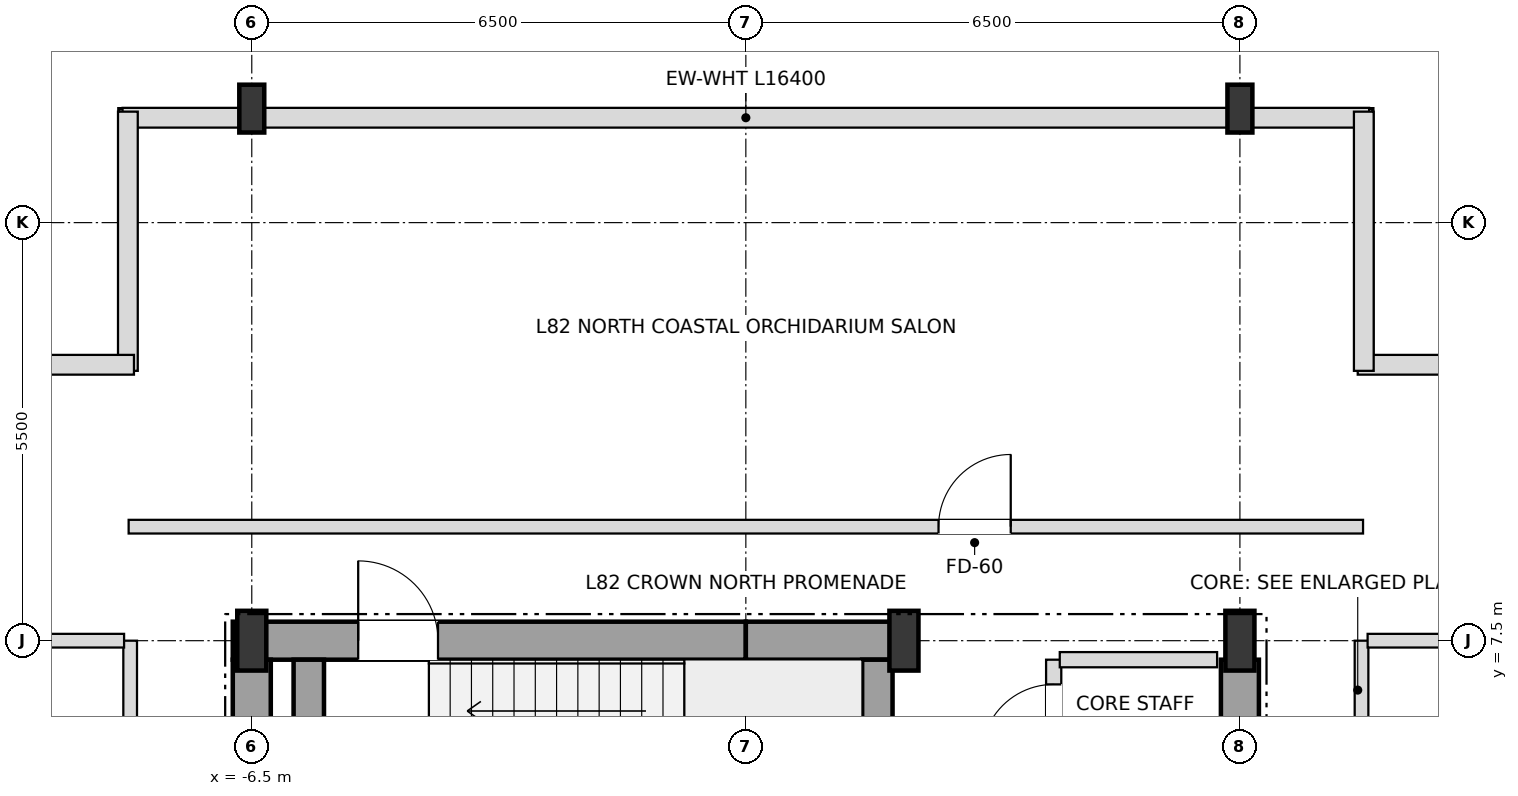
"""IFC4 building model, lengths in metres.
Left out: names, types, materials, properties, quantities, classifications, styles, units other than length and angle.
Written with IfcOpenShell. Run it as: python <this file> out.ifc"""

import sys

from ifc_helpers import new_model, si_unit, direction, frame, frame_2d, origin, origin_2d, place, context, subcontext, project, spatial, rectangle, i_section, extrude, element, fill, save


model = new_model("IFC4")
c1 = context("Model", 3, precision=1e-05, world=origin(), true_north=direction((0.0, 1.0)))
c2 = subcontext(c1, "Body", "Model", "MODEL_VIEW")
j1 = project(units=[si_unit("LENGTHUNIT", "METRE"), si_unit("PLANEANGLEUNIT", "RADIAN")], contexts=[c1])
p1 = place(None, origin())
s1 = spatial("IfcSite", under=j1, at=p1, CompositionType="ELEMENT")
p2 = place(p1, origin())
s2 = spatial("IfcBuilding", under=s1, at=p2, CompositionType="ELEMENT")
p3 = place(p2, frame((0.0, 0.0, 314.4)))
s3 = spatial("IfcBuildingStorey", under=s2, at=p3, CompositionType="ELEMENT", Elevation=314.4)
for number, where, z_axis, x_axis in (
    (1, (-6.5, 7.5, 0.0), (0.0, 0.0, 1.0), (1.0, 0.0, 0.0)),
    (2, (2.08, 7.5, 0.0), (0.0, 0.0, 1.0), (1.0, 0.0, 0.0)),
    (3, (6.5, 7.5, 0.0), (0.0, 0.0, 1.0), (1.0, 0.0, 0.0)),
):
    element("IfcColumn", number, at=place(p3, frame(where, z_axis=z_axis, x_axis=x_axis)), inside=s3, PredefinedType="COLUMN", context=c2, shape_type="SweptSolid", body=[
        extrude(i_section(OverallWidth=0.382, OverallDepth=0.786, WebThickness=0.02, FlangeThickness=0.033, at=origin_2d()), origin(), (0.0, 0.0, 1.0), 4.5),
    ])
for number, where, z_axis, x_axis in (
    (4, (-6.5, 14.5, 0.0), (0.0, 0.0, 1.0), (1.0, 0.0, 0.0)),
    (5, (6.5, 14.5, 0.0), (0.0, 0.0, 1.0), (1.0, 0.0, 0.0)),
):
    element("IfcColumn", number, at=place(p3, frame(where, z_axis=z_axis, x_axis=x_axis)), inside=s3, PredefinedType="COLUMN", context=c2, shape_type="SweptSolid", body=[
        extrude(i_section(OverallWidth=0.328, OverallDepth=0.629, WebThickness=0.014, FlangeThickness=0.021, at=origin_2d()), origin(), (0.0, 0.0, 1.0), 4.5),
    ])
p4 = place(p3, frame((8.2, 14.38, 0.0), z_axis=(0.0, 0.0, 1.0), x_axis=(-1.0, 0.0, 0.0)))
e6 = element("IfcWall", 6, at=p4, inside=s3, PredefinedType="SOLIDWALL", context=c2, shape_type="SweptSolid", body=[
    extrude(rectangle(XDim=16.4, YDim=0.26, at=frame_2d((8.2, 0.0))), origin(), (0.0, 0.0, 1.0), 3.918),
])
for number, where, z_axis, x_axis in (
    (7, (11.46, 11.13, 0.0), (0.0, 0.0, 1.0), (-1.0, 0.0, 0.0)),
    (8, (8.13, 11.05, 0.0), (0.0, 0.0, 1.0), (0.0, 1.0, 0.0)),
    (9, (-8.13, 14.46, 0.0), (0.0, 0.0, 1.0), (0.0, -1.0, 0.0)),
    (10, (-8.05, 11.13, 0.0), (0.0, 0.0, 1.0), (-1.0, 0.0, 0.0)),
):
    element("IfcWall", number, at=place(p3, frame(where, z_axis=z_axis, x_axis=x_axis)), inside=s3, PredefinedType="SOLIDWALL", context=c2, shape_type="SweptSolid", body=[
        extrude(rectangle(XDim=3.41, YDim=0.26, at=frame_2d((1.705, 0.0))), origin(), (0.0, 0.0, 1.0), 4.25),
    ])
p5 = place(p3, frame((-6.75, 7.5, 0.0), z_axis=(0.0, 0.0, 1.0), x_axis=(1.0, 0.0, 0.0)))
e11 = element("IfcWall", 11, at=p5, inside=s3, PredefinedType="SHEAR", context=c2, shape_type="SweptSolid", body=[
    extrude(rectangle(XDim=6.75, YDim=0.5, at=frame_2d((3.375, 0.0))), origin(), (0.0, 0.0, 1.0), 4.25),
])
p6 = place(p5, frame((1.65, 0.0, 0.0)))
e12 = element("IfcOpeningElement", 12, at=p6, cuts=e11, PredefinedType="OPENING", context=c2, shape_type="SweptSolid", body=[
    extrude(rectangle(XDim=1.05, YDim=2.15, at=frame_2d((0.525, 1.075))), frame((0.0, 0.26, 0.0), z_axis=(0.0, -1.0, 0.0), x_axis=(1.0, 0.0, 0.0)), (0.0, 0.0, 1.0), 0.52),
])
p7 = place(p3, frame((0.0, 7.5, 0.0), z_axis=(0.0, 0.0, 1.0), x_axis=(1.0, 0.0, 0.0)))
e13 = element("IfcWall", 13, at=p7, inside=s3, PredefinedType="SHEAR", context=c2, shape_type="SweptSolid", body=[
    extrude(rectangle(XDim=2.08, YDim=0.5, at=frame_2d((1.04, 0.0))), origin(), (0.0, 0.0, 1.0), 4.25),
])
for number, where, z_axis, x_axis in (
    (14, (-6.5, 3.95, 0.0), (0.0, 0.0, 1.0), (0.0, 1.0, 0.0)),
    (15, (6.5, 3.95, 0.0), (0.0, 0.0, 1.0), (0.0, 1.0, 0.0)),
):
    element("IfcWall", number, at=place(p3, frame(where, z_axis=z_axis, x_axis=x_axis)), inside=s3, PredefinedType="SHEAR", context=c2, shape_type="SweptSolid", body=[
        extrude(rectangle(XDim=3.3, YDim=0.5, at=frame_2d((1.65, 0.0))), origin(), (0.0, 0.0, 1.0), 4.25),
    ])
for number, where, z_axis, x_axis in (
    (16, (1.73, 3.95, 0.0), (0.0, 0.0, 1.0), (0.0, 1.0, 0.0)),
    (17, (-5.75, 3.95, 0.0), (0.0, 0.0, 1.0), (0.0, 1.0, 0.0)),
):
    element("IfcWall", number, at=place(p3, frame(where, z_axis=z_axis, x_axis=x_axis)), inside=s3, PredefinedType="SHEAR", context=c2, shape_type="SweptSolid", body=[
        extrude(rectangle(XDim=3.3, YDim=0.4, at=frame_2d((1.65, 0.0))), origin(), (0.0, 0.0, 1.0), 4.25),
    ])
p8 = place(p3, frame((-8.1, -7.5, 0.0), z_axis=(0.0, 0.0, 1.0), x_axis=(0.0, 1.0, 0.0)))
e18 = element("IfcWall", 18, at=p8, inside=s3, PredefinedType="PARTITIONING", context=c2, shape_type="SweptSolid", body=[
    extrude(rectangle(XDim=15.0, YDim=0.18, at=frame_2d((7.5, 0.0))), origin(), (0.0, 0.0, 1.0), 4.25),
])
p9 = place(p8, frame((4.525, 0.0, 0.0)))
e19 = element("IfcOpeningElement", 19, at=p9, cuts=e18, PredefinedType="OPENING", context=c2, shape_type="SweptSolid", body=[
    extrude(rectangle(XDim=0.95, YDim=2.15, at=frame_2d((0.475, 1.075))), frame((0.0, 0.1, 0.0), z_axis=(0.0, -1.0, 0.0), x_axis=(1.0, 0.0, 0.0)), (0.0, 0.0, 1.0), 0.2),
])
p10 = place(p3, frame((4.05, 4.2, 0.0), z_axis=(0.0, 0.0, 1.0), x_axis=(0.0, 1.0, 0.0)))
e20 = element("IfcWall", 20, at=p10, inside=s3, PredefinedType="SOLIDWALL", context=c2, shape_type="SweptSolid", body=[
    extrude(rectangle(XDim=3.05, YDim=0.2, at=frame_2d((1.525, 0.0))), origin(), (0.0, 0.0, 1.0), 4.25),
])
p11 = place(p10, frame((0.275, 0.0, 0.0)))
e21 = element("IfcOpeningElement", 21, at=p11, cuts=e20, PredefinedType="OPENING", context=c2, shape_type="SweptSolid", body=[
    extrude(rectangle(XDim=0.95, YDim=2.15, at=frame_2d((0.475, 1.075))), frame((0.0, 0.11, 0.0), z_axis=(0.0, -1.0, 0.0), x_axis=(1.0, 0.0, 0.0)), (0.0, 0.0, 1.0), 0.22),
])
p12 = place(p10, frame((1.775, 0.0, 0.0)))
e22 = element("IfcOpeningElement", 22, at=p12, cuts=e20, PredefinedType="OPENING", context=c2, shape_type="SweptSolid", body=[
    extrude(rectangle(XDim=0.95, YDim=2.15, at=frame_2d((0.475, 1.075))), frame((0.0, 0.11, 0.0), z_axis=(0.0, -1.0, 0.0), x_axis=(1.0, 0.0, 0.0)), (0.0, 0.0, 1.0), 0.22),
])
p13 = place(p3, frame((8.1, -7.5, 0.0), z_axis=(0.0, 0.0, 1.0), x_axis=(0.0, 1.0, 0.0)))
e23 = element("IfcWall", 23, at=p13, inside=s3, PredefinedType="PARTITIONING", context=c2, shape_type="SweptSolid", body=[
    extrude(rectangle(XDim=15.0, YDim=0.18, at=frame_2d((7.5, 0.0))), origin(), (0.0, 0.0, 1.0), 4.25),
])
p14 = place(p13, frame((4.525, 0.0, 0.0)))
e24 = element("IfcOpeningElement", 24, at=p14, cuts=e23, PredefinedType="OPENING", context=c2, shape_type="SweptSolid", body=[
    extrude(rectangle(XDim=0.95, YDim=2.15, at=frame_2d((0.475, 1.075))), frame((0.0, 0.1, 0.0), z_axis=(0.0, -1.0, 0.0), x_axis=(1.0, 0.0, 0.0)), (0.0, 0.0, 1.0), 0.2),
])
p15 = place(p13, frame((11.825, 0.0, 0.0)))
e25 = element("IfcOpeningElement", 25, at=p15, cuts=e23, PredefinedType="OPENING", context=c2, shape_type="SweptSolid", body=[
    extrude(rectangle(XDim=0.95, YDim=2.15, at=frame_2d((0.475, 1.075))), frame((0.0, 0.1, 0.0), z_axis=(0.0, -1.0, 0.0), x_axis=(1.0, 0.0, 0.0)), (0.0, 0.0, 1.0), 0.2),
])
p16 = place(p3, frame((4.13, 7.25, 0.0), z_axis=(0.0, 0.0, 1.0), x_axis=(1.0, 0.0, 0.0)))
e26 = element("IfcWall", 26, at=p16, inside=s3, PredefinedType="SOLIDWALL", context=c2, shape_type="SweptSolid", body=[
    extrude(rectangle(XDim=2.07, YDim=0.2, at=frame_2d((1.035, 0.0))), origin(), (0.0, 0.0, 1.0), 4.25),
])
for number, where, z_axis, x_axis in (
    (27, (-11.245, 7.5, 0.0), (0.0, 0.0, 1.0), (1.0, 0.0, 0.0)),
    (28, (8.18, 7.5, 0.0), (0.0, 0.0, 1.0), (1.0, 0.0, 0.0)),
):
    element("IfcWall", number, at=place(p3, frame(where, z_axis=z_axis, x_axis=x_axis)), inside=s3, PredefinedType="PARTITIONING", context=c2, shape_type="SweptSolid", body=[
        extrude(rectangle(XDim=3.065, YDim=0.18, at=frame_2d((1.533, 0.0))), origin(), (0.0, 0.0, 1.0), 3.918),
    ])
p17 = place(p3, frame((-8.12, 9.0, 0.0), z_axis=(0.0, 0.0, 1.0), x_axis=(1.0, 0.0, 0.0)))
e29 = element("IfcWall", 29, at=p17, inside=s3, PredefinedType="PARTITIONING", context=c2, shape_type="SweptSolid", body=[
    extrude(rectangle(XDim=16.24, YDim=0.18, at=frame_2d((8.12, 0.0))), origin(), (0.0, 0.0, 1.0), 4.25),
])
p18 = place(p17, frame((10.655, 0.0, 0.0)))
e30 = element("IfcOpeningElement", 30, at=p18, cuts=e29, PredefinedType="OPENING", context=c2, shape_type="SweptSolid", body=[
    extrude(rectangle(XDim=0.95, YDim=2.15, at=frame_2d((0.475, 1.075))), frame((0.0, 0.1, 0.0), z_axis=(0.0, -1.0, 0.0), x_axis=(1.0, 0.0, 0.0)), (0.0, 0.0, 1.0), 0.2),
])
p19 = place(p6, origin())
e31 = element("IfcDoor", 31, at=p19, inside=s3, OperationType="SINGLE_SWING_LEFT", PredefinedType="DOOR", context=c2, shape_type="SweptSolid", body=[
    extrude(rectangle(XDim=1.05, YDim=2.15, at=frame_2d((0.525, 1.075))), frame((0.0, 0.025, 0.0), z_axis=(0.0, -1.0, 0.0), x_axis=(1.0, 0.0, 0.0)), (0.0, 0.0, 1.0), 0.05),
])
fill(e12, e31)
p20 = place(p12, origin())
e32 = element("IfcDoor", 32, at=p20, inside=s3, OperationType="SINGLE_SWING_LEFT", PredefinedType="DOOR", context=c2, shape_type="SweptSolid", body=[
    extrude(rectangle(XDim=0.95, YDim=2.15, at=frame_2d((0.475, 1.075))), frame((0.0, 0.025, 0.0), z_axis=(0.0, -1.0, 0.0), x_axis=(1.0, 0.0, 0.0)), (0.0, 0.0, 1.0), 0.05),
])
fill(e22, e32)
p21 = place(p18, origin())
e33 = element("IfcDoor", 33, at=p21, inside=s3, OperationType="SINGLE_SWING_RIGHT", PredefinedType="DOOR", context=c2, shape_type="SweptSolid", body=[
    extrude(rectangle(XDim=0.95, YDim=2.15, at=frame_2d((0.475, 1.075))), frame((0.0, 0.025, 0.0), z_axis=(0.0, -1.0, 0.0), x_axis=(1.0, 0.0, 0.0)), (0.0, 0.0, 1.0), 0.05),
])
fill(e30, e33)
save(model, sys.argv[1])
